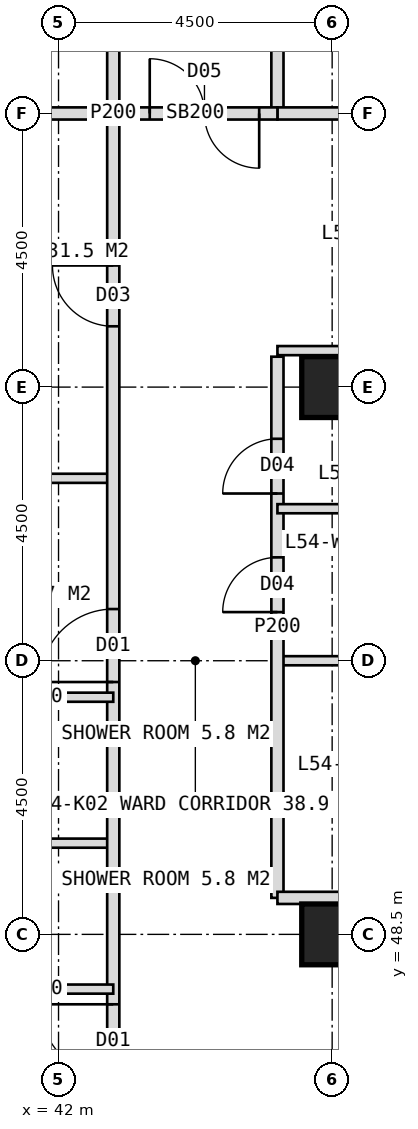
"""IFC4 building model, lengths in metres.
Left out: names, types, materials, properties, quantities, classifications, styles, units other than length and angle.
Written with IfcOpenShell. Run it as: python <this file> out.ifc"""

import sys

from ifc_helpers import new_model, si_unit, direction, frame, frame_2d, origin, origin_2d, place, context, subcontext, project, spatial, rectangle, hollow_rectangle, extrude, element, fill, save


model = new_model("IFC4")
c1 = context("Model", 3, precision=1e-05, world=origin(), true_north=direction((0.0, 1.0)))
c2 = subcontext(c1, "Body", "Model", "MODEL_VIEW")
j1 = project(units=[si_unit("LENGTHUNIT", "METRE"), si_unit("PLANEANGLEUNIT", "RADIAN")], contexts=[c1])
p1 = place(None, origin())
s1 = spatial("IfcSite", under=j1, at=p1, CompositionType="ELEMENT")
p2 = place(p1, origin())
s2 = spatial("IfcBuilding", under=s1, at=p2, CompositionType="ELEMENT")
p3 = place(p2, frame((0.0, 0.0, 225.0)))
s3 = spatial("IfcBuildingStorey", under=s2, at=p3, CompositionType="ELEMENT", Elevation=225.0)
for number, where, z_axis, x_axis in (
    (1, (46.5, 48.5, 0.0), (0.0, 0.0, 1.0), (1.0, 0.0, 0.0)),
    (2, (46.5, 57.5, 0.0), (0.0, 0.0, 1.0), (1.0, 0.0, 0.0)),
):
    element("IfcColumn", number, at=place(p3, frame(where, z_axis=z_axis, x_axis=x_axis)), inside=s3, PredefinedType="COLUMN", context=c2, shape_type="SweptSolid", body=[
        extrude(hollow_rectangle(XDim=1.0, YDim=1.0, WallThickness=0.1, at=origin_2d()), origin(), (0.0, 0.0, 1.0), 4.0),
    ])
for number, where, z_axis, x_axis in (
    (3, (42.9, 50.0, 0.0), (0.0, 0.0, 1.0), (-1.0, 0.0, 0.0)),
    (4, (42.9, 56.0, 0.0), (0.0, 0.0, 1.0), (-1.0, 0.0, 0.0)),
):
    element("IfcWall", number, at=place(p3, frame(where, z_axis=z_axis, x_axis=x_axis)), inside=s3, PredefinedType="PARTITIONING", context=c2, shape_type="SweptSolid", body=[
        extrude(rectangle(XDim=5.25, YDim=0.15, at=frame_2d((2.625, 0.0))), origin(), (0.0, 0.0, 1.0), 3.75),
    ])
p4 = place(p3, frame((42.9, 62.0, 0.0), z_axis=(0.0, 0.0, 1.0), x_axis=(-1.0, 0.0, 0.0)))
e5 = element("IfcWall", 5, at=p4, inside=s3, PredefinedType="SOLIDWALL", context=c2, shape_type="SweptSolid", body=[
    extrude(rectangle(XDim=5.25, YDim=0.2, at=frame_2d((2.625, 0.0))), origin(), (0.0, 0.0, 1.0), 2.95),
])
p5 = place(p3, frame((42.9, 44.9, 0.0), z_axis=(0.0, 0.0, 1.0), x_axis=(0.0, 1.0, 0.0)))
e6 = element("IfcWall", 6, at=p5, inside=s3, PredefinedType="PARTITIONING", context=c2, shape_type="SweptSolid", body=[
    extrude(rectangle(XDim=34.2, YDim=0.2, at=frame_2d((17.1, 0.0))), origin(), (0.0, 0.0, 1.0), 3.75),
])
p6 = place(p5, frame((1.25, 0.0, 0.0)))
e7 = element("IfcOpeningElement", 7, at=p6, cuts=e6, PredefinedType="OPENING", context=c2, shape_type="SweptSolid", body=[
    extrude(rectangle(XDim=1.2, YDim=2.2, at=frame_2d((0.6, 1.1))), frame((0.0, 0.11, 0.0), z_axis=(0.0, -1.0, 0.0), x_axis=(1.0, 0.0, 0.0)), (0.0, 0.0, 1.0), 0.22),
])
p7 = place(p5, frame((7.75, 0.0, 0.0)))
e8 = element("IfcOpeningElement", 8, at=p7, cuts=e6, PredefinedType="OPENING", context=c2, shape_type="SweptSolid", body=[
    extrude(rectangle(XDim=1.2, YDim=2.2, at=frame_2d((0.6, 1.1))), frame((0.0, 0.11, 0.0), z_axis=(0.0, -1.0, 0.0), x_axis=(1.0, 0.0, 0.0)), (0.0, 0.0, 1.0), 0.22),
])
p8 = place(p5, frame((13.6, 0.0, 0.0)))
e9 = element("IfcOpeningElement", 9, at=p8, cuts=e6, PredefinedType="OPENING", context=c2, shape_type="SweptSolid", body=[
    extrude(rectangle(XDim=1.0, YDim=2.1, at=frame_2d((0.5, 1.05))), frame((0.0, 0.11, 0.0), z_axis=(0.0, -1.0, 0.0), x_axis=(1.0, 0.0, 0.0)), (0.0, 0.0, 1.0), 0.22),
])
p9 = place(p5, frame((19.75, 0.0, 0.0)))
e10 = element("IfcOpeningElement", 10, at=p9, cuts=e6, PredefinedType="OPENING", context=c2, shape_type="SweptSolid", body=[
    extrude(rectangle(XDim=1.2, YDim=2.2, at=frame_2d((0.6, 1.1))), frame((0.0, 0.11, 0.0), z_axis=(0.0, -1.0, 0.0), x_axis=(1.0, 0.0, 0.0)), (0.0, 0.0, 1.0), 0.22),
])
p10 = place(p5, frame((30.35, 0.0, 0.0)))
e11 = element("IfcOpeningElement", 11, at=p10, cuts=e6, PredefinedType="OPENING", context=c2, shape_type="SweptSolid", body=[
    extrude(rectangle(XDim=1.2, YDim=2.2, at=frame_2d((0.6, 1.1))), frame((0.0, 0.11, 0.0), z_axis=(0.0, -1.0, 0.0), x_axis=(1.0, 0.0, 0.0)), (0.0, 0.0, 1.0), 0.22),
])
for number, where, z_axis, x_axis in (
    (12, (42.9, 47.6, 0.0), (0.0, 0.0, 1.0), (-1.0, 0.0, 0.0)),
    (13, (42.9, 52.4, 0.0), (0.0, 0.0, 1.0), (-1.0, 0.0, 0.0)),
):
    element("IfcWall", number, at=place(p3, frame(where, z_axis=z_axis, x_axis=x_axis)), inside=s3, PredefinedType="PARTITIONING", context=c2, shape_type="SweptSolid", body=[
        extrude(rectangle(XDim=2.4, YDim=0.15, at=frame_2d((1.2, 0.0))), origin(), (0.0, 0.0, 1.0), 3.75),
    ])
p11 = place(p3, frame((51.0, 53.0, 0.0), z_axis=(0.0, 0.0, 1.0), x_axis=(-1.0, 0.0, 0.0)))
e14 = element("IfcWall", 14, at=p11, inside=s3, PredefinedType="PARTITIONING", context=c2, shape_type="SweptSolid", body=[
    extrude(rectangle(XDim=5.4, YDim=0.15, at=frame_2d((2.7, 0.0))), origin(), (0.0, 0.0, 1.0), 3.75),
])
p12 = place(p3, frame((45.6, 49.1, 0.0), z_axis=(0.0, 0.0, 1.0), x_axis=(0.0, 1.0, 0.0)))
e15 = element("IfcWall", 15, at=p12, inside=s3, PredefinedType="PARTITIONING", context=c2, shape_type="SweptSolid", body=[
    extrude(rectangle(XDim=8.9, YDim=0.2, at=frame_2d((4.45, 0.0))), origin(), (0.0, 0.0, 1.0), 3.75),
])
p13 = place(p12, frame((4.7, 0.0, 0.0)))
e16 = element("IfcOpeningElement", 16, at=p13, cuts=e15, PredefinedType="OPENING", context=c2, shape_type="SweptSolid", body=[
    extrude(rectangle(XDim=0.9, YDim=2.1, at=frame_2d((0.45, 1.05))), frame((0.0, 0.11, 0.0), z_axis=(0.0, -1.0, 0.0), x_axis=(1.0, 0.0, 0.0)), (0.0, 0.0, 1.0), 0.22),
])
p14 = place(p12, frame((6.65, 0.0, 0.0)))
e17 = element("IfcOpeningElement", 17, at=p14, cuts=e15, PredefinedType="OPENING", context=c2, shape_type="SweptSolid", body=[
    extrude(rectangle(XDim=0.9, YDim=2.1, at=frame_2d((0.45, 1.05))), frame((0.0, 0.11, 0.0), z_axis=(0.0, -1.0, 0.0), x_axis=(1.0, 0.0, 0.0)), (0.0, 0.0, 1.0), 0.22),
])
p15 = place(p3, frame((45.6, 62.0, 0.0), z_axis=(0.0, 0.0, 1.0), x_axis=(0.0, 1.0, 0.0)))
e18 = element("IfcWall", 18, at=p15, inside=s3, PredefinedType="PARTITIONING", context=c2, shape_type="SweptSolid", body=[
    extrude(rectangle(XDim=14.4, YDim=0.2, at=frame_2d((7.2, 0.0))), origin(), (0.0, 0.0, 1.0), 3.75),
])
p16 = place(p15, frame((2.5, 0.0, 0.0)))
e19 = element("IfcOpeningElement", 19, at=p16, cuts=e18, PredefinedType="OPENING", context=c2, shape_type="SweptSolid", body=[
    extrude(rectangle(XDim=1.0, YDim=2.1, at=frame_2d((0.5, 1.05))), frame((0.0, 0.11, 0.0), z_axis=(0.0, -1.0, 0.0), x_axis=(1.0, 0.0, 0.0)), (0.0, 0.0, 1.0), 0.22),
])
p17 = place(p15, frame((7.0, 0.0, 0.0)))
e20 = element("IfcOpeningElement", 20, at=p17, cuts=e18, PredefinedType="OPENING", context=c2, shape_type="SweptSolid", body=[
    extrude(rectangle(XDim=1.0, YDim=2.1, at=frame_2d((0.5, 1.05))), frame((0.0, 0.11, 0.0), z_axis=(0.0, -1.0, 0.0), x_axis=(1.0, 0.0, 0.0)), (0.0, 0.0, 1.0), 0.22),
])
p18 = place(p15, frame((11.2, 0.0, 0.0)))
e21 = element("IfcOpeningElement", 21, at=p18, cuts=e18, PredefinedType="OPENING", context=c2, shape_type="SweptSolid", body=[
    extrude(rectangle(XDim=1.0, YDim=2.1, at=frame_2d((0.5, 1.05))), frame((0.0, 0.11, 0.0), z_axis=(0.0, -1.0, 0.0), x_axis=(1.0, 0.0, 0.0)), (0.0, 0.0, 1.0), 0.22),
])
p19 = place(p3, frame((51.0, 58.1, 0.0), z_axis=(0.0, 0.0, 1.0), x_axis=(-1.0, 0.0, 0.0)))
e22 = element("IfcWall", 22, at=p19, inside=s3, PredefinedType="PARTITIONING", context=c2, shape_type="SweptSolid", body=[
    extrude(rectangle(XDim=5.4, YDim=0.15, at=frame_2d((2.7, 0.0))), origin(), (0.0, 0.0, 1.0), 3.75),
])
p20 = place(p19, frame((0.6, 0.0, 0.0)))
e23 = element("IfcOpeningElement", 23, at=p20, cuts=e22, PredefinedType="OPENING", context=c2, shape_type="SweptSolid", body=[
    extrude(rectangle(XDim=0.9, YDim=2.1, at=frame_2d((0.45, 1.05))), frame((0.0, 0.085, 0.0), z_axis=(0.0, -1.0, 0.0), x_axis=(1.0, 0.0, 0.0)), (0.0, 0.0, 1.0), 0.17),
])
p21 = place(p3, frame((51.0, 62.0, 0.0), z_axis=(0.0, 0.0, 1.0), x_axis=(-1.0, 0.0, 0.0)))
e24 = element("IfcWall", 24, at=p21, inside=s3, PredefinedType="SOLIDWALL", context=c2, shape_type="SweptSolid", body=[
    extrude(rectangle(XDim=5.4, YDim=0.2, at=frame_2d((2.7, 0.0))), origin(), (0.0, 0.0, 1.0), 2.95),
])
p22 = place(p3, frame((51.0, 55.5, 0.0), z_axis=(0.0, 0.0, 1.0), x_axis=(-1.0, 0.0, 0.0)))
e25 = element("IfcWall", 25, at=p22, inside=s3, PredefinedType="PARTITIONING", context=c2, shape_type="SweptSolid", body=[
    extrude(rectangle(XDim=5.4, YDim=0.15, at=frame_2d((2.7, 0.0))), origin(), (0.0, 0.0, 1.0), 3.75),
])
p23 = place(p3, frame((57.75, 49.1, 0.0), z_axis=(0.0, 0.0, 1.0), x_axis=(-1.0, 0.0, 0.0)))
e26 = element("IfcWall", 26, at=p23, inside=s3, PredefinedType="PARTITIONING", context=c2, shape_type="SweptSolid", body=[
    extrude(rectangle(XDim=12.15, YDim=0.2, at=frame_2d((6.075, 0.0))), origin(), (0.0, 0.0, 1.0), 3.75),
])
p24 = place(p23, frame((0.325, 0.0, 0.0)))
e27 = element("IfcOpeningElement", 27, at=p24, cuts=e26, PredefinedType="OPENING", context=c2, shape_type="SweptSolid", body=[
    extrude(rectangle(XDim=1.0, YDim=2.1, at=frame_2d((0.5, 1.05))), frame((0.0, 0.11, 0.0), z_axis=(0.0, -1.0, 0.0), x_axis=(1.0, 0.0, 0.0)), (0.0, 0.0, 1.0), 0.22),
])
p25 = place(p23, frame((5.5, 0.0, 0.0)))
e28 = element("IfcOpeningElement", 28, at=p25, cuts=e26, PredefinedType="OPENING", context=c2, shape_type="SweptSolid", body=[
    extrude(rectangle(XDim=1.0, YDim=2.1, at=frame_2d((0.5, 1.05))), frame((0.0, 0.11, 0.0), z_axis=(0.0, -1.0, 0.0), x_axis=(1.0, 0.0, 0.0)), (0.0, 0.0, 1.0), 0.22),
])
p26 = place(p23, frame((8.95, 0.0, 0.0)))
e29 = element("IfcOpeningElement", 29, at=p26, cuts=e26, PredefinedType="OPENING", context=c2, shape_type="SweptSolid", body=[
    extrude(rectangle(XDim=1.0, YDim=2.1, at=frame_2d((0.5, 1.05))), frame((0.0, 0.11, 0.0), z_axis=(0.0, -1.0, 0.0), x_axis=(1.0, 0.0, 0.0)), (0.0, 0.0, 1.0), 0.22),
])
p27 = place(p3, frame((45.6, 62.0, 0.0), z_axis=(0.0, 0.0, 1.0), x_axis=(-1.0, 0.0, 0.0)))
e30 = element("IfcWall", 30, at=p27, inside=s3, PredefinedType="SOLIDWALL", context=c2, shape_type="SweptSolid", body=[
    extrude(rectangle(XDim=2.7, YDim=0.2, at=frame_2d((1.35, 0.0))), origin(), (0.0, 0.0, 1.0), 2.95),
])
p28 = place(p27, frame((0.3, 0.0, 0.0)))
e31 = element("IfcOpeningElement", 31, at=p28, cuts=e30, PredefinedType="OPENING", context=c2, shape_type="SweptSolid", body=[
    extrude(rectangle(XDim=1.8, YDim=2.2, at=frame_2d((0.9, 1.1))), frame((0.0, 0.11, 0.0), z_axis=(0.0, -1.0, 0.0), x_axis=(1.0, 0.0, 0.0)), (0.0, 0.0, 1.0), 0.22),
])
p29 = place(p6, origin())
e32 = element("IfcDoor", 32, at=p29, inside=s3, OperationType="SINGLE_SWING_RIGHT", PredefinedType="DOOR", context=c2, shape_type="SweptSolid", body=[
    extrude(rectangle(XDim=1.2, YDim=2.2, at=frame_2d((0.6, 1.1))), frame((0.0, 0.025, 0.0), z_axis=(0.0, -1.0, 0.0), x_axis=(1.0, 0.0, 0.0)), (0.0, 0.0, 1.0), 0.05),
])
fill(e7, e32)
p30 = place(p7, origin())
e33 = element("IfcDoor", 33, at=p30, inside=s3, OperationType="SINGLE_SWING_LEFT", PredefinedType="DOOR", context=c2, shape_type="SweptSolid", body=[
    extrude(rectangle(XDim=1.2, YDim=2.2, at=frame_2d((0.6, 1.1))), frame((0.0, 0.025, 0.0), z_axis=(0.0, -1.0, 0.0), x_axis=(1.0, 0.0, 0.0)), (0.0, 0.0, 1.0), 0.05),
])
fill(e8, e33)
p31 = place(p8, origin())
e34 = element("IfcDoor", 34, at=p31, inside=s3, OperationType="SINGLE_SWING_RIGHT", PredefinedType="DOOR", context=c2, shape_type="SweptSolid", body=[
    extrude(rectangle(XDim=1.0, YDim=2.1, at=frame_2d((0.5, 1.05))), frame((0.0, 0.025, 0.0), z_axis=(0.0, -1.0, 0.0), x_axis=(1.0, 0.0, 0.0)), (0.0, 0.0, 1.0), 0.05),
])
fill(e9, e34)
p32 = place(p13, origin())
e35 = element("IfcDoor", 35, at=p32, inside=s3, OperationType="SINGLE_SWING_LEFT", PredefinedType="DOOR", context=c2, shape_type="SweptSolid", body=[
    extrude(rectangle(XDim=0.9, YDim=2.1, at=frame_2d((0.45, 1.05))), frame((0.0, 0.025, 0.0), z_axis=(0.0, -1.0, 0.0), x_axis=(1.0, 0.0, 0.0)), (0.0, 0.0, 1.0), 0.05),
])
fill(e16, e35)
p33 = place(p14, origin())
e36 = element("IfcDoor", 36, at=p33, inside=s3, OperationType="SINGLE_SWING_LEFT", PredefinedType="DOOR", context=c2, shape_type="SweptSolid", body=[
    extrude(rectangle(XDim=0.9, YDim=2.1, at=frame_2d((0.45, 1.05))), frame((0.0, 0.025, 0.0), z_axis=(0.0, -1.0, 0.0), x_axis=(1.0, 0.0, 0.0)), (0.0, 0.0, 1.0), 0.05),
])
fill(e17, e36)
p34 = place(p28, origin())
e37 = element("IfcDoor", 37, at=p34, inside=s3, OperationType="DOUBLE_DOOR_DOUBLE_SWING", PredefinedType="DOOR", context=c2, shape_type="SweptSolid", body=[
    extrude(rectangle(XDim=1.8, YDim=2.2, at=frame_2d((0.9, 1.1))), frame((0.0, 0.025, 0.0), z_axis=(0.0, -1.0, 0.0), x_axis=(1.0, 0.0, 0.0)), (0.0, 0.0, 1.0), 0.05),
])
fill(e31, e37)
save(model, sys.argv[1])
